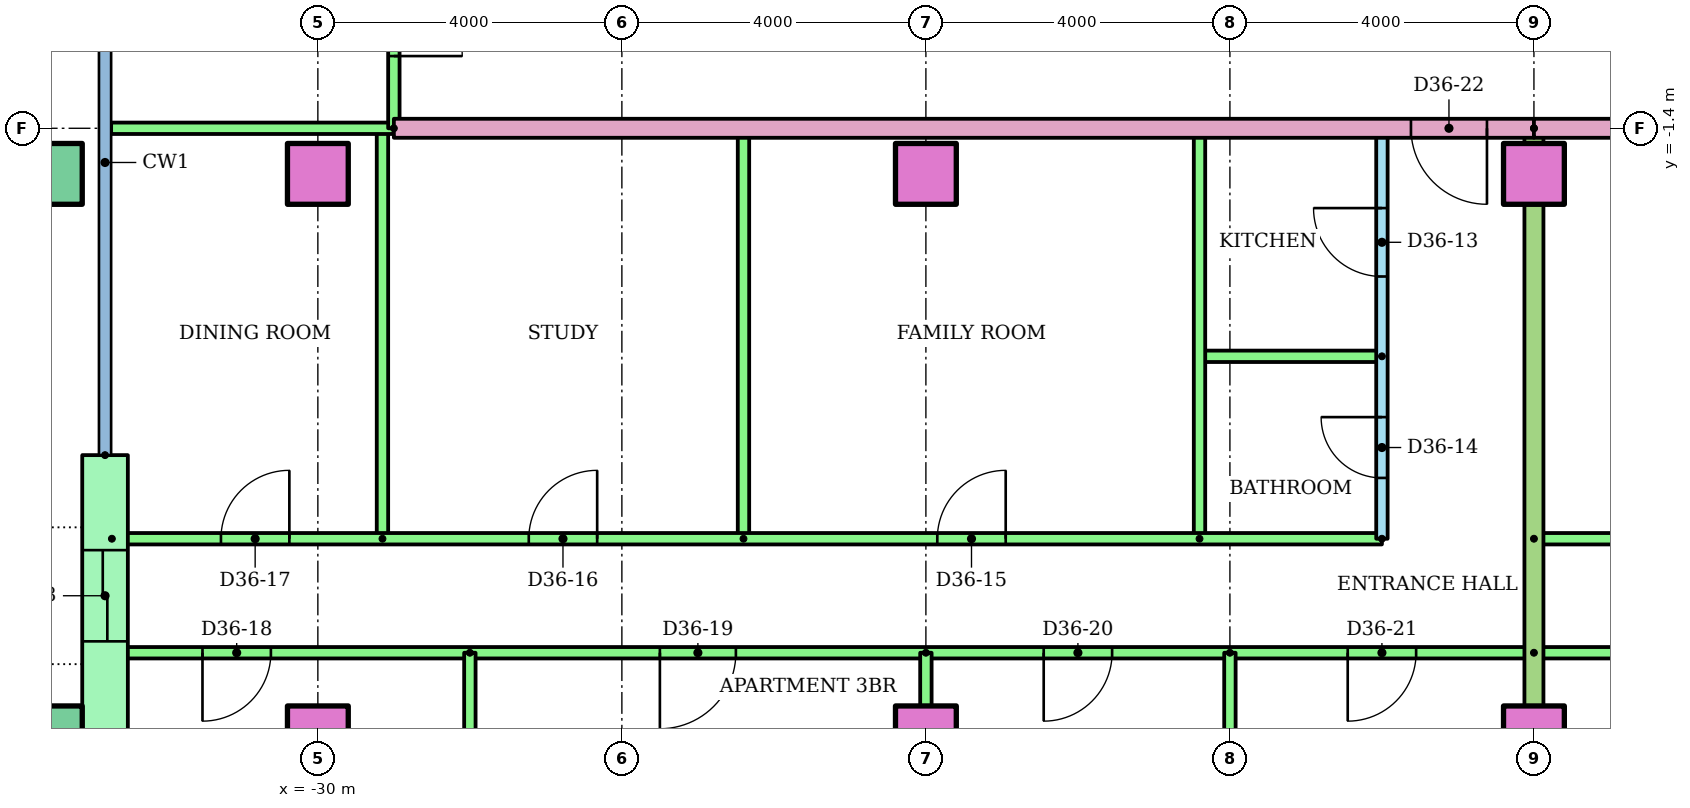
"""IFC4 building model, lengths in metres.
Left out: names, types, materials, properties, quantities, classifications, styles, units other than length and angle.
Written with IfcOpenShell. Run it as: python <this file> out.ifc"""

import sys

from ifc_helpers import new_model, si_unit, direction, frame, frame_2d, origin, origin_2d, place, context, subcontext, project, spatial, rectangle, hollow_rectangle, extrude, element, fill, save


model = new_model("IFC4")
c1 = context("Model", 3, precision=1e-05, world=origin(), true_north=direction((0.0, 1.0)))
c2 = subcontext(c1, "Body", "Model", "MODEL_VIEW")
j1 = project(units=[si_unit("LENGTHUNIT", "METRE"), si_unit("PLANEANGLEUNIT", "RADIAN")], contexts=[c1])
p1 = place(None, origin())
s1 = spatial("IfcSite", under=j1, at=p1, CompositionType="ELEMENT")
p2 = place(p1, origin())
s2 = spatial("IfcBuilding", under=s1, at=p2, CompositionType="ELEMENT")
p3 = place(p2, frame((0.0, 0.0, 139.0)))
s3 = spatial("IfcBuildingStorey", under=s2, at=p3, CompositionType="ELEMENT", Elevation=139.0)
p4 = place(p3, frame((-33.5, -9.4, 0.0)))
e1 = element("IfcColumn", 1, at=p4, inside=s3, PredefinedType="COLUMN", context=c2, shape_type="SweptSolid", body=[
    extrude(hollow_rectangle(XDim=0.8, YDim=0.8, WallThickness=0.04, at=origin_2d()), origin(), (0.0, 0.0, 1.0), 3.2),
])
for number, where in (
    (2, (-30.0, -9.4, 0.0)),
    (3, (-22.0, -9.4, 0.0)),
    (4, (-14.0, -9.4, 0.0)),
):
    element("IfcColumn", number, at=place(p3, frame(where)), inside=s3, PredefinedType="COLUMN", context=c2, shape_type="SweptSolid", body=[
        extrude(rectangle(XDim=0.8, YDim=0.8, at=origin_2d()), origin(), (0.0, 0.0, 1.0), 3.2),
    ])
p5 = place(p3, frame((-33.5, -2.0, 0.0)))
e5 = element("IfcColumn", 5, at=p5, inside=s3, PredefinedType="COLUMN", context=c2, shape_type="SweptSolid", body=[
    extrude(hollow_rectangle(XDim=0.8, YDim=0.8, WallThickness=0.04, at=origin_2d()), origin(), (0.0, 0.0, 1.0), 3.2),
])
for number, where in (
    (6, (-30.0, -2.0, 0.0)),
    (7, (-22.0, -2.0, 0.0)),
    (8, (-14.0, -2.0, 0.0)),
):
    element("IfcColumn", number, at=place(p3, frame(where)), inside=s3, PredefinedType="COLUMN", context=c2, shape_type="SweptSolid", body=[
        extrude(rectangle(XDim=0.8, YDim=0.8, at=origin_2d()), origin(), (0.0, 0.0, 1.0), 3.2),
    ])
p6 = place(p3, frame((-32.8, -5.7, 0.0), z_axis=(0.0, 0.0, 1.0), x_axis=(0.0, -1.0, 0.0)))
e9 = element("IfcWall", 9, at=p6, inside=s3, PredefinedType="STANDARD", context=c2, shape_type="SweptSolid", body=[
    extrude(rectangle(XDim=3.7, YDim=0.6, at=frame_2d((1.85, 0.0))), origin(), (0.0, 0.0, 1.0), 2.92),
])
p7 = place(p6, frame((1.25, 0.0, 0.0)))
e10 = element("IfcOpeningElement", 10, at=p7, cuts=e9, PredefinedType="OPENING", context=c2, shape_type="SweptSolid", body=[
    extrude(rectangle(XDim=1.2, YDim=2.1, at=frame_2d((0.6, 1.05))), frame((0.0, 0.31, 0.0), z_axis=(0.0, -1.0, 0.0), x_axis=(1.0, 0.0, 0.0)), (0.0, 0.0, 1.0), 0.62),
])
p8 = place(p3, frame((-16.0, -6.8, 0.0), z_axis=(0.0, 0.0, 1.0), x_axis=(0.0, 1.0, 0.0)))
e11 = element("IfcWall", 11, at=p8, inside=s3, PredefinedType="PARTITIONING", context=c2, shape_type="SweptSolid", body=[
    extrude(rectangle(XDim=5.4, YDim=0.15, at=frame_2d((2.7, 0.0))), origin(), (0.0, 0.0, 1.0), 2.4),
])
p9 = place(p8, frame((3.45, 0.0, 0.0)))
e12 = element("IfcOpeningElement", 12, at=p9, cuts=e11, PredefinedType="OPENING", context=c2, shape_type="SweptSolid", body=[
    extrude(rectangle(XDim=0.9, YDim=2.1, at=frame_2d((0.45, 1.05))), frame((0.0, 0.085, 0.0), z_axis=(0.0, -1.0, 0.0), x_axis=(1.0, 0.0, 0.0)), (0.0, 0.0, 1.0), 0.17),
])
p10 = place(p8, frame((0.8, 0.0, 0.0)))
e13 = element("IfcOpeningElement", 13, at=p10, cuts=e11, PredefinedType="OPENING", context=c2, shape_type="SweptSolid", body=[
    extrude(rectangle(XDim=0.8, YDim=2.1, at=frame_2d((0.4, 1.05))), frame((0.0, 0.085, 0.0), z_axis=(0.0, -1.0, 0.0), x_axis=(1.0, 0.0, 0.0)), (0.0, 0.0, 1.0), 0.17),
])
p11 = place(p3, frame((-16.0, -4.4, 0.0), z_axis=(0.0, 0.0, 1.0), x_axis=(-1.0, 0.0, 0.0)))
e14 = element("IfcWall", 14, at=p11, inside=s3, PredefinedType="PARTITIONING", context=c2, shape_type="SweptSolid", body=[
    extrude(rectangle(XDim=2.4, YDim=0.15, at=frame_2d((1.2, 0.0))), origin(), (0.0, 0.0, 1.0), 2.4),
])
for number, where, z_axis, x_axis in (
    (15, (-18.4, -6.8, 0.0), (0.0, 0.0, 1.0), (0.0, 1.0, 0.0)),
    (16, (-24.4, -6.8, 0.0), (0.0, 0.0, 1.0), (0.0, 1.0, 0.0)),
    (17, (-29.15, -6.8, 0.0), (0.0, 0.0, 1.0), (0.0, 1.0, 0.0)),
):
    element("IfcWall", number, at=place(p3, frame(where, z_axis=z_axis, x_axis=x_axis)), inside=s3, PredefinedType="PARTITIONING", context=c2, shape_type="SweptSolid", body=[
        extrude(rectangle(XDim=5.4, YDim=0.15, at=frame_2d((2.7, 0.0))), origin(), (0.0, 0.0, 1.0), 2.4),
    ])
p12 = place(p3, frame((-32.71, -6.8, 0.0)))
e18 = element("IfcWall", 18, at=p12, inside=s3, PredefinedType="PARTITIONING", context=c2, shape_type="SweptSolid", body=[
    extrude(rectangle(XDim=16.71, YDim=0.15, at=frame_2d((8.355, 0.0))), origin(), (0.0, 0.0, 1.0), 2.4),
])
p13 = place(p12, frame((10.86, 0.0, 0.0)))
e19 = element("IfcOpeningElement", 19, at=p13, cuts=e18, PredefinedType="OPENING", context=c2, shape_type="SweptSolid", body=[
    extrude(rectangle(XDim=0.9, YDim=2.1, at=frame_2d((0.45, 1.05))), frame((0.0, 0.085, 0.0), z_axis=(0.0, -1.0, 0.0), x_axis=(1.0, 0.0, 0.0)), (0.0, 0.0, 1.0), 0.17),
])
p14 = place(p12, frame((5.485, 0.0, 0.0)))
e20 = element("IfcOpeningElement", 20, at=p14, cuts=e18, PredefinedType="OPENING", context=c2, shape_type="SweptSolid", body=[
    extrude(rectangle(XDim=0.9, YDim=2.1, at=frame_2d((0.45, 1.05))), frame((0.0, 0.085, 0.0), z_axis=(0.0, -1.0, 0.0), x_axis=(1.0, 0.0, 0.0)), (0.0, 0.0, 1.0), 0.17),
])
p15 = place(p12, frame((1.435, 0.0, 0.0)))
e21 = element("IfcOpeningElement", 21, at=p15, cuts=e18, PredefinedType="OPENING", context=c2, shape_type="SweptSolid", body=[
    extrude(rectangle(XDim=0.9, YDim=2.1, at=frame_2d((0.45, 1.05))), frame((0.0, 0.085, 0.0), z_axis=(0.0, -1.0, 0.0), x_axis=(1.0, 0.0, 0.0)), (0.0, 0.0, 1.0), 0.17),
])
p16 = place(p3, frame((-14.0, -8.3, 0.0), z_axis=(0.0, 0.0, 1.0), x_axis=(-1.0, 0.0, 0.0)))
e22 = element("IfcWall", 22, at=p16, inside=s3, PredefinedType="PARTITIONING", context=c2, shape_type="SweptSolid", body=[
    extrude(rectangle(XDim=18.71, YDim=0.15, at=frame_2d((9.355, 0.0))), origin(), (0.0, 0.0, 1.0), 2.4),
])
p17 = place(p16, frame((16.618, 0.0, 0.0)))
e23 = element("IfcOpeningElement", 23, at=p17, cuts=e22, PredefinedType="OPENING", context=c2, shape_type="SweptSolid", body=[
    extrude(rectangle(XDim=0.9, YDim=2.1, at=frame_2d((0.45, 1.05))), frame((0.0, 0.085, 0.0), z_axis=(0.0, -1.0, 0.0), x_axis=(1.0, 0.0, 0.0)), (0.0, 0.0, 1.0), 0.17),
])
p18 = place(p16, frame((10.5, 0.0, 0.0)))
e24 = element("IfcOpeningElement", 24, at=p18, cuts=e22, PredefinedType="OPENING", context=c2, shape_type="SweptSolid", body=[
    extrude(rectangle(XDim=1.0, YDim=2.1, at=frame_2d((0.5, 1.05))), frame((0.0, 0.085, 0.0), z_axis=(0.0, -1.0, 0.0), x_axis=(1.0, 0.0, 0.0)), (0.0, 0.0, 1.0), 0.17),
])
p19 = place(p16, frame((5.55, 0.0, 0.0)))
e25 = element("IfcOpeningElement", 25, at=p19, cuts=e22, PredefinedType="OPENING", context=c2, shape_type="SweptSolid", body=[
    extrude(rectangle(XDim=0.9, YDim=2.1, at=frame_2d((0.45, 1.05))), frame((0.0, 0.085, 0.0), z_axis=(0.0, -1.0, 0.0), x_axis=(1.0, 0.0, 0.0)), (0.0, 0.0, 1.0), 0.17),
])
p20 = place(p16, frame((1.55, 0.0, 0.0)))
e26 = element("IfcOpeningElement", 26, at=p20, cuts=e22, PredefinedType="OPENING", context=c2, shape_type="SweptSolid", body=[
    extrude(rectangle(XDim=0.9, YDim=2.1, at=frame_2d((0.45, 1.05))), frame((0.0, 0.085, 0.0), z_axis=(0.0, -1.0, 0.0), x_axis=(1.0, 0.0, 0.0)), (0.0, 0.0, 1.0), 0.17),
])
p21 = place(p3, frame((-28.0, -8.3, 0.0), z_axis=(0.0, 0.0, 1.0), x_axis=(0.0, -1.0, 0.0)))
e27 = element("IfcWall", 27, at=p21, inside=s3, PredefinedType="PARTITIONING", context=c2, shape_type="SweptSolid", body=[
    extrude(rectangle(XDim=6.22, YDim=0.15, at=frame_2d((3.11, 0.0))), origin(), (0.0, 0.0, 1.0), 2.4),
])
p22 = place(p3, frame((-22.0, -8.3, 0.0), z_axis=(0.0, 0.0, 1.0), x_axis=(0.0, -1.0, 0.0)))
e28 = element("IfcWall", 28, at=p22, inside=s3, PredefinedType="PARTITIONING", context=c2, shape_type="SweptSolid", body=[
    extrude(rectangle(XDim=8.01, YDim=0.15, at=frame_2d((4.005, 0.0))), origin(), (0.0, 0.0, 1.0), 2.4),
])
p23 = place(p3, frame((-18.0, -8.3, 0.0), z_axis=(0.0, 0.0, 1.0), x_axis=(0.0, -1.0, 0.0)))
e29 = element("IfcWall", 29, at=p23, inside=s3, PredefinedType="PARTITIONING", context=c2, shape_type="SweptSolid", body=[
    extrude(rectangle(XDim=8.021, YDim=0.15, at=frame_2d((4.01, 0.0))), origin(), (0.0, 0.0, 1.0), 2.4),
])
p24 = place(p3, frame((-14.0, -6.8, 0.0)))
e30 = element("IfcWall", 30, at=p24, inside=s3, PredefinedType="PARTITIONING", context=c2, shape_type="SweptSolid", body=[
    extrude(rectangle(XDim=22.0, YDim=0.15, at=frame_2d((11.0, 0.0))), origin(), (0.0, 0.0, 1.0), 2.4),
])
p25 = place(p24, frame((16.65, 0.0, 0.0)))
e31 = element("IfcOpeningElement", 31, at=p25, cuts=e30, PredefinedType="OPENING", context=c2, shape_type="SweptSolid", body=[
    extrude(rectangle(XDim=0.9, YDim=2.1, at=frame_2d((0.45, 1.05))), frame((0.0, 0.085, 0.0), z_axis=(0.0, -1.0, 0.0), x_axis=(1.0, 0.0, 0.0)), (0.0, 0.0, 1.0), 0.17),
])
p26 = place(p24, frame((10.9, 0.0, 0.0)))
e32 = element("IfcOpeningElement", 32, at=p26, cuts=e30, PredefinedType="OPENING", context=c2, shape_type="SweptSolid", body=[
    extrude(rectangle(XDim=0.9, YDim=2.1, at=frame_2d((0.45, 1.05))), frame((0.0, 0.085, 0.0), z_axis=(0.0, -1.0, 0.0), x_axis=(1.0, 0.0, 0.0)), (0.0, 0.0, 1.0), 0.17),
])
p27 = place(p24, frame((3.6, 0.0, 0.0)))
e33 = element("IfcOpeningElement", 33, at=p27, cuts=e30, PredefinedType="OPENING", context=c2, shape_type="SweptSolid", body=[
    extrude(rectangle(XDim=0.9, YDim=2.1, at=frame_2d((0.45, 1.05))), frame((0.0, 0.085, 0.0), z_axis=(0.0, -1.0, 0.0), x_axis=(1.0, 0.0, 0.0)), (0.0, 0.0, 1.0), 0.17),
])
p28 = place(p3, frame((10.0, -8.3, 0.0), z_axis=(0.0, 0.0, 1.0), x_axis=(-1.0, 0.0, 0.0)))
e34 = element("IfcWall", 34, at=p28, inside=s3, PredefinedType="PARTITIONING", context=c2, shape_type="SweptSolid", body=[
    extrude(rectangle(XDim=24.0, YDim=0.15, at=frame_2d((12.0, 0.0))), origin(), (0.0, 0.0, 1.0), 2.4),
])
p29 = place(p28, frame((19.5, 0.0, 0.0)))
e35 = element("IfcOpeningElement", 35, at=p29, cuts=e34, PredefinedType="OPENING", context=c2, shape_type="SweptSolid", body=[
    extrude(rectangle(XDim=1.0, YDim=2.1, at=frame_2d((0.5, 1.05))), frame((0.0, 0.085, 0.0), z_axis=(0.0, -1.0, 0.0), x_axis=(1.0, 0.0, 0.0)), (0.0, 0.0, 1.0), 0.17),
])
p30 = place(p28, frame((13.55, 0.0, 0.0)))
e36 = element("IfcOpeningElement", 36, at=p30, cuts=e34, PredefinedType="OPENING", context=c2, shape_type="SweptSolid", body=[
    extrude(rectangle(XDim=0.9, YDim=2.1, at=frame_2d((0.45, 1.05))), frame((0.0, 0.085, 0.0), z_axis=(0.0, -1.0, 0.0), x_axis=(1.0, 0.0, 0.0)), (0.0, 0.0, 1.0), 0.17),
])
p31 = place(p28, frame((9.55, 0.0, 0.0)))
e37 = element("IfcOpeningElement", 37, at=p31, cuts=e34, PredefinedType="OPENING", context=c2, shape_type="SweptSolid", body=[
    extrude(rectangle(XDim=0.9, YDim=2.1, at=frame_2d((0.45, 1.05))), frame((0.0, 0.085, 0.0), z_axis=(0.0, -1.0, 0.0), x_axis=(1.0, 0.0, 0.0)), (0.0, 0.0, 1.0), 0.17),
])
p32 = place(p28, frame((5.55, 0.0, 0.0)))
e38 = element("IfcOpeningElement", 38, at=p32, cuts=e34, PredefinedType="OPENING", context=c2, shape_type="SweptSolid", body=[
    extrude(rectangle(XDim=0.9, YDim=2.1, at=frame_2d((0.45, 1.05))), frame((0.0, 0.085, 0.0), z_axis=(0.0, -1.0, 0.0), x_axis=(1.0, 0.0, 0.0)), (0.0, 0.0, 1.0), 0.17),
])
p33 = place(p28, frame((1.55, 0.0, 0.0)))
e39 = element("IfcOpeningElement", 39, at=p33, cuts=e34, PredefinedType="OPENING", context=c2, shape_type="SweptSolid", body=[
    extrude(rectangle(XDim=0.9, YDim=2.1, at=frame_2d((0.45, 1.05))), frame((0.0, 0.085, 0.0), z_axis=(0.0, -1.0, 0.0), x_axis=(1.0, 0.0, 0.0)), (0.0, 0.0, 1.0), 0.17),
])
p34 = place(p3, frame((-14.0, -1.4, 0.0), z_axis=(0.0, 0.0, 1.0), x_axis=(0.0, -1.0, 0.0)))
e40 = element("IfcWall", 40, at=p34, inside=s3, PredefinedType="PARTITIONING", context=c2, shape_type="SweptSolid", body=[
    extrude(rectangle(XDim=14.91, YDim=0.25, at=frame_2d((7.455, 0.0))), origin(), (0.0, 0.0, 1.0), 2.4),
])
p35 = place(p3, frame((-14.0, -1.4, 0.0), z_axis=(0.0, 0.0, 1.0), x_axis=(-1.0, 0.0, 0.0)))
e41 = element("IfcWall", 41, at=p35, inside=s3, PredefinedType="PARTITIONING", context=c2, shape_type="SweptSolid", body=[
    extrude(rectangle(XDim=15.0, YDim=0.25, at=frame_2d((7.5, 0.0))), origin(), (0.0, 0.0, 1.0), 2.4),
])
p36 = place(p35, frame((0.618, 0.0, 0.0)))
e42 = element("IfcOpeningElement", 42, at=p36, cuts=e41, PredefinedType="OPENING", context=c2, shape_type="SweptSolid", body=[
    extrude(rectangle(XDim=1.0, YDim=2.1, at=frame_2d((0.5, 1.05))), frame((0.0, 0.135, 0.0), z_axis=(0.0, -1.0, 0.0), x_axis=(1.0, 0.0, 0.0)), (0.0, 0.0, 1.0), 0.27),
])
p37 = place(p3, frame((-29.0, -1.4, 0.0), z_axis=(0.0, 0.0, 1.0), x_axis=(-1.0, 0.0, 0.0)))
e43 = element("IfcWall", 43, at=p37, inside=s3, PredefinedType="PARTITIONING", context=c2, shape_type="SweptSolid", body=[
    extrude(rectangle(XDim=3.72, YDim=0.15, at=frame_2d((1.86, 0.0))), origin(), (0.0, 0.0, 1.0), 2.4),
])
p38 = place(p3, frame((-29.0, 1.4, 0.0), z_axis=(0.0, 0.0, 1.0), x_axis=(0.0, -1.0, 0.0)))
e44 = element("IfcWall", 44, at=p38, inside=s3, PredefinedType="PARTITIONING", context=c2, shape_type="SweptSolid", body=[
    extrude(rectangle(XDim=2.8, YDim=0.15, at=frame_2d((1.4, 0.0))), origin(), (0.0, 0.0, 1.0), 2.4),
])
p39 = place(p38, frame((0.95, 0.0, 0.0)))
e45 = element("IfcOpeningElement", 45, at=p39, cuts=e44, PredefinedType="OPENING", context=c2, shape_type="SweptSolid", body=[
    extrude(rectangle(XDim=0.9, YDim=2.1, at=frame_2d((0.45, 1.05))), frame((0.0, 0.085, 0.0), z_axis=(0.0, -1.0, 0.0), x_axis=(1.0, 0.0, 0.0)), (0.0, 0.0, 1.0), 0.17),
])
p40 = place(p3, frame((14.0, -1.4, 0.0), z_axis=(0.0, 0.0, 1.0), x_axis=(-1.0, 0.0, 0.0)))
e46 = element("IfcWall", 46, at=p40, inside=s3, PredefinedType="PARTITIONING", context=c2, shape_type="SweptSolid", body=[
    extrude(rectangle(XDim=28.0, YDim=0.25, at=frame_2d((14.0, 0.0))), origin(), (0.0, 0.0, 1.0), 2.4),
])
p41 = place(p40, frame((4.618, 0.0, 0.0)))
e47 = element("IfcOpeningElement", 47, at=p41, cuts=e46, PredefinedType="OPENING", context=c2, shape_type="SweptSolid", body=[
    extrude(rectangle(XDim=1.0, YDim=2.1, at=frame_2d((0.5, 1.05))), frame((0.0, 0.135, 0.0), z_axis=(0.0, -1.0, 0.0), x_axis=(1.0, 0.0, 0.0)), (0.0, 0.0, 1.0), 0.27),
])
p42 = place(p40, frame((2.382, 0.0, 0.0)))
e48 = element("IfcOpeningElement", 48, at=p42, cuts=e46, PredefinedType="OPENING", context=c2, shape_type="SweptSolid", body=[
    extrude(rectangle(XDim=1.0, YDim=2.1, at=frame_2d((0.5, 1.05))), frame((0.0, 0.135, 0.0), z_axis=(0.0, -1.0, 0.0), x_axis=(1.0, 0.0, 0.0)), (0.0, 0.0, 1.0), 0.27),
])
p43 = place(p9, origin())
e49 = element("IfcDoor", 49, at=p43, inside=s3, OperationType="SINGLE_SWING_RIGHT", PredefinedType="DOOR", context=c2, shape_type="SweptSolid", body=[
    extrude(rectangle(XDim=0.9, YDim=2.1, at=frame_2d((0.45, 1.05))), frame((0.0, 0.025, 0.0), z_axis=(0.0, -1.0, 0.0), x_axis=(1.0, 0.0, 0.0)), (0.0, 0.0, 1.0), 0.05),
])
fill(e12, e49)
p44 = place(p10, origin())
e50 = element("IfcDoor", 50, at=p44, inside=s3, OperationType="SINGLE_SWING_RIGHT", PredefinedType="DOOR", context=c2, shape_type="SweptSolid", body=[
    extrude(rectangle(XDim=0.8, YDim=2.1, at=frame_2d((0.4, 1.05))), frame((0.0, 0.025, 0.0), z_axis=(0.0, -1.0, 0.0), x_axis=(1.0, 0.0, 0.0)), (0.0, 0.0, 1.0), 0.05),
])
fill(e13, e50)
p45 = place(p13, origin())
e51 = element("IfcDoor", 51, at=p45, inside=s3, OperationType="SINGLE_SWING_RIGHT", PredefinedType="DOOR", context=c2, shape_type="SweptSolid", body=[
    extrude(rectangle(XDim=0.9, YDim=2.1, at=frame_2d((0.45, 1.05))), frame((0.0, 0.025, 0.0), z_axis=(0.0, -1.0, 0.0), x_axis=(1.0, 0.0, 0.0)), (0.0, 0.0, 1.0), 0.05),
])
fill(e19, e51)
p46 = place(p14, origin())
e52 = element("IfcDoor", 52, at=p46, inside=s3, OperationType="SINGLE_SWING_RIGHT", PredefinedType="DOOR", context=c2, shape_type="SweptSolid", body=[
    extrude(rectangle(XDim=0.9, YDim=2.1, at=frame_2d((0.45, 1.05))), frame((0.0, 0.025, 0.0), z_axis=(0.0, -1.0, 0.0), x_axis=(1.0, 0.0, 0.0)), (0.0, 0.0, 1.0), 0.05),
])
fill(e20, e52)
p47 = place(p15, origin())
e53 = element("IfcDoor", 53, at=p47, inside=s3, OperationType="SINGLE_SWING_RIGHT", PredefinedType="DOOR", context=c2, shape_type="SweptSolid", body=[
    extrude(rectangle(XDim=0.9, YDim=2.1, at=frame_2d((0.45, 1.05))), frame((0.0, 0.025, 0.0), z_axis=(0.0, -1.0, 0.0), x_axis=(1.0, 0.0, 0.0)), (0.0, 0.0, 1.0), 0.05),
])
fill(e21, e53)
p48 = place(p17, origin())
e54 = element("IfcDoor", 54, at=p48, inside=s3, OperationType="SINGLE_SWING_RIGHT", PredefinedType="DOOR", context=c2, shape_type="SweptSolid", body=[
    extrude(rectangle(XDim=0.9, YDim=2.1, at=frame_2d((0.45, 1.05))), frame((0.0, 0.025, 0.0), z_axis=(0.0, -1.0, 0.0), x_axis=(1.0, 0.0, 0.0)), (0.0, 0.0, 1.0), 0.05),
])
fill(e23, e54)
p49 = place(p18, origin())
e55 = element("IfcDoor", 55, at=p49, inside=s3, OperationType="SINGLE_SWING_RIGHT", PredefinedType="DOOR", context=c2, shape_type="SweptSolid", body=[
    extrude(rectangle(XDim=1.0, YDim=2.1, at=frame_2d((0.5, 1.05))), frame((0.0, 0.025, 0.0), z_axis=(0.0, -1.0, 0.0), x_axis=(1.0, 0.0, 0.0)), (0.0, 0.0, 1.0), 0.05),
])
fill(e24, e55)
p50 = place(p19, origin())
e56 = element("IfcDoor", 56, at=p50, inside=s3, OperationType="SINGLE_SWING_RIGHT", PredefinedType="DOOR", context=c2, shape_type="SweptSolid", body=[
    extrude(rectangle(XDim=0.9, YDim=2.1, at=frame_2d((0.45, 1.05))), frame((0.0, 0.025, 0.0), z_axis=(0.0, -1.0, 0.0), x_axis=(1.0, 0.0, 0.0)), (0.0, 0.0, 1.0), 0.05),
])
fill(e25, e56)
p51 = place(p20, origin())
e57 = element("IfcDoor", 57, at=p51, inside=s3, OperationType="SINGLE_SWING_RIGHT", PredefinedType="DOOR", context=c2, shape_type="SweptSolid", body=[
    extrude(rectangle(XDim=0.9, YDim=2.1, at=frame_2d((0.45, 1.05))), frame((0.0, 0.025, 0.0), z_axis=(0.0, -1.0, 0.0), x_axis=(1.0, 0.0, 0.0)), (0.0, 0.0, 1.0), 0.05),
])
fill(e26, e57)
p52 = place(p36, origin())
e58 = element("IfcDoor", 58, at=p52, inside=s3, OperationType="SINGLE_SWING_LEFT", PredefinedType="DOOR", context=c2, shape_type="SweptSolid", body=[
    extrude(rectangle(XDim=1.0, YDim=2.1, at=frame_2d((0.5, 1.05))), frame((0.0, 0.025, 0.0), z_axis=(0.0, -1.0, 0.0), x_axis=(1.0, 0.0, 0.0)), (0.0, 0.0, 1.0), 0.05),
])
fill(e42, e58)
p53 = place(p39, origin())
e59 = element("IfcDoor", 59, at=p53, inside=s3, OperationType="SINGLE_SWING_RIGHT", PredefinedType="DOOR", context=c2, shape_type="SweptSolid", body=[
    extrude(rectangle(XDim=0.9, YDim=2.1, at=frame_2d((0.45, 1.05))), frame((0.0, 0.025, 0.0), z_axis=(0.0, -1.0, 0.0), x_axis=(1.0, 0.0, 0.0)), (0.0, 0.0, 1.0), 0.05),
])
fill(e45, e59)
p54 = place(p7, origin())
e60 = element("IfcDoor", 60, at=p54, inside=s3, OperationType="SLIDING_TO_LEFT", PredefinedType="DOOR", context=c2, shape_type="SweptSolid", body=[
    extrude(rectangle(XDim=1.2, YDim=2.1, at=frame_2d((0.6, 1.05))), frame((0.0, 0.025, 0.0), z_axis=(0.0, -1.0, 0.0), x_axis=(1.0, 0.0, 0.0)), (0.0, 0.0, 1.0), 0.05),
])
fill(e10, e60)
save(model, sys.argv[1])
